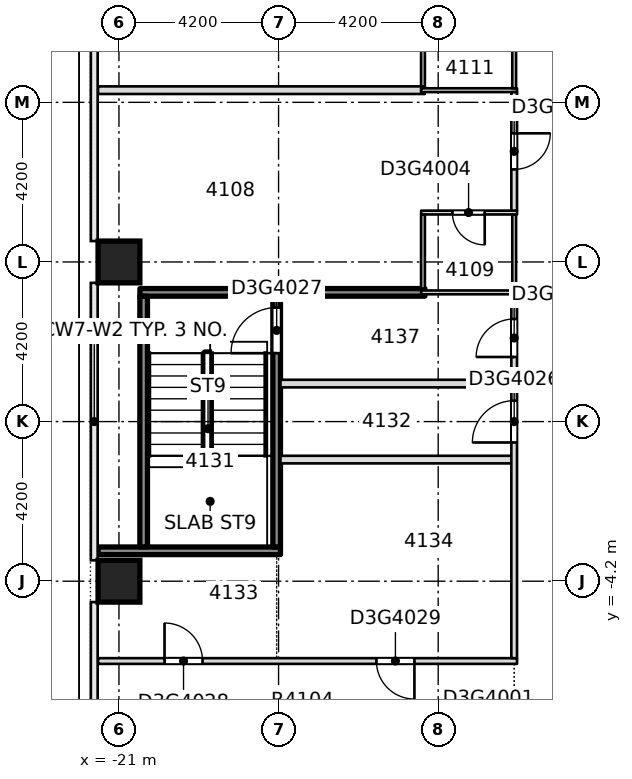
"""IFC4 building model, lengths in metres.
Left out: names, types, materials, properties, quantities, classifications, styles, units other than length and angle.
Written with IfcOpenShell. Run it as: python <this file> out.ifc"""

import sys

from ifc_helpers import new_model, si_unit, direction, frame, frame_2d, origin, origin_2d, place, context, subcontext, project, spatial, rectangle, extrude, element, fill, save


model = new_model("IFC4")
c1 = context("Model", 3, precision=1e-05, world=origin(), true_north=direction((0.0, 1.0)))
c2 = subcontext(c1, "Body", "Model", "MODEL_VIEW")
j1 = project(units=[si_unit("LENGTHUNIT", "METRE"), si_unit("PLANEANGLEUNIT", "RADIAN")], contexts=[c1])
p1 = place(None, origin())
s1 = spatial("IfcSite", under=j1, at=p1, CompositionType="ELEMENT")
p2 = place(p1, origin())
s2 = spatial("IfcBuilding", under=s1, at=p2, CompositionType="ELEMENT")
p3 = place(p2, frame((0.0, 0.0, 160.7)))
s3 = spatial("IfcBuildingStorey", under=s2, at=p3, CompositionType="ELEMENT", Elevation=160.7)
for number, where, z_axis, x_axis in (
    (1, (-21.0, -4.2, -0.4), (0.0, 0.0, 1.0), (1.0, 0.0, 0.0)),
    (2, (-21.0, 4.2, -0.4), (0.0, 0.0, 1.0), (1.0, 0.0, 0.0)),
):
    element("IfcColumn", number, at=place(p3, frame(where, z_axis=z_axis, x_axis=x_axis)), inside=s3, PredefinedType="COLUMN", context=c2, shape_type="SweptSolid", body=[
        extrude(rectangle(XDim=1.1, YDim=1.1, at=origin_2d()), origin(), (0.0, 0.0, 1.0), 3.45),
    ])
p4 = place(p3, frame((-21.55, -6.3, 0.0), z_axis=(0.0, 0.0, 1.0), x_axis=(1.0, 0.0, 0.0)))
e3 = element("IfcWall", 3, at=p4, inside=s3, PredefinedType="PARTITIONING", context=c2, shape_type="SweptSolid", body=[
    extrude(rectangle(XDim=11.025, YDim=0.15, at=frame_2d((5.513, 0.0))), origin(), (0.0, 0.0, 1.0), 3.05),
])
p5 = place(p4, frame((1.75, 0.0, 0.0)))
e4 = element("IfcOpeningElement", 4, at=p5, cuts=e3, PredefinedType="OPENING", context=c2, shape_type="SweptSolid", body=[
    extrude(rectangle(XDim=1.0, YDim=2.1, at=frame_2d((0.5, 1.05))), frame((0.0, 0.085, 0.0), z_axis=(0.0, -1.0, 0.0), x_axis=(1.0, 0.0, 0.0)), (0.0, 0.0, 1.0), 0.17),
])
p6 = place(p4, frame((7.325, 0.0, 0.0)))
e5 = element("IfcOpeningElement", 5, at=p6, cuts=e3, PredefinedType="OPENING", context=c2, shape_type="SweptSolid", body=[
    extrude(rectangle(XDim=1.0, YDim=2.1, at=frame_2d((0.5, 1.05))), frame((0.0, 0.085, 0.0), z_axis=(0.0, -1.0, 0.0), x_axis=(1.0, 0.0, 0.0)), (0.0, 0.0, 1.0), 0.17),
])
p7 = place(p3, frame((-21.55, -3.4, 0.0), z_axis=(0.0, 0.0, 1.0), x_axis=(1.0, 0.0, 0.0)))
e6 = element("IfcWall", 6, at=p7, inside=s3, PredefinedType="SOLIDWALL", context=c2, shape_type="SweptSolid", body=[
    extrude(rectangle(XDim=4.799, YDim=0.2, at=frame_2d((2.399, 0.0))), origin(), (0.0, 0.0, 1.0), 3.05),
])
for number, where, z_axis, x_axis in (
    (7, (-16.75, -1.0, 0.0), (0.0, 0.0, 1.0), (1.0, 0.0, 0.0)),
    (8, (-16.75, 1.0, 0.0), (0.0, 0.0, 1.0), (1.0, 0.0, 0.0)),
):
    element("IfcWall", number, at=place(p3, frame(where, z_axis=z_axis, x_axis=x_axis)), inside=s3, PredefinedType="PARTITIONING", context=c2, shape_type="SweptSolid", body=[
        extrude(rectangle(XDim=6.075, YDim=0.2, at=frame_2d((3.038, 0.0))), origin(), (0.0, 0.0, 1.0), 3.05),
    ])
p8 = place(p3, frame((-20.448, 3.4, 0.0), z_axis=(0.0, 0.0, 1.0), x_axis=(1.0, 0.0, 0.0)))
e9 = element("IfcWall", 9, at=p8, inside=s3, PredefinedType="SOLIDWALL", context=c2, shape_type="SweptSolid", body=[
    extrude(rectangle(XDim=7.498, YDim=0.2, at=frame_2d((3.749, 0.0))), origin(), (0.0, 0.0, 1.0), 3.05),
])
p9 = place(p3, frame((-13.05, 3.4, 0.0), z_axis=(0.0, 0.0, 1.0), x_axis=(1.0, 0.0, 0.0)))
e10 = element("IfcWall", 10, at=p9, inside=s3, PredefinedType="PARTITIONING", context=c2, shape_type="SweptSolid", body=[
    extrude(rectangle(XDim=2.525, YDim=0.1, at=frame_2d((1.263, 0.0))), origin(), (0.0, 0.0, 1.0), 3.05),
])
p10 = place(p3, frame((-13.048, 5.5, 0.0), z_axis=(0.0, 0.0, 1.0), x_axis=(1.0, 0.0, 0.0)))
e11 = element("IfcWall", 11, at=p10, inside=s3, PredefinedType="PARTITIONING", context=c2, shape_type="SweptSolid", body=[
    extrude(rectangle(XDim=2.523, YDim=0.1, at=frame_2d((1.262, 0.0))), origin(), (0.0, 0.0, 1.0), 3.05),
])
p11 = place(p10, frame((0.823, 0.0, 0.0)))
e12 = element("IfcOpeningElement", 12, at=p11, cuts=e11, PredefinedType="OPENING", context=c2, shape_type="SweptSolid", body=[
    extrude(rectangle(XDim=0.85, YDim=2.1, at=frame_2d((0.425, 1.05))), frame((0.0, 0.06, 0.0), z_axis=(0.0, -1.0, 0.0), x_axis=(1.0, 0.0, 0.0)), (0.0, 0.0, 1.0), 0.12),
])
p12 = place(p3, frame((-21.55, 8.72, 0.0), z_axis=(0.0, 0.0, 1.0), x_axis=(1.0, 0.0, 0.0)))
e13 = element("IfcWall", 13, at=p12, inside=s3, PredefinedType="PARTITIONING", context=c2, shape_type="SweptSolid", body=[
    extrude(rectangle(XDim=8.6, YDim=0.2, at=frame_2d((4.3, 0.0))), origin(), (0.0, 0.0, 1.0), 3.05),
])
p13 = place(p3, frame((-13.05, 8.72, 0.0), z_axis=(0.0, 0.0, 1.0), x_axis=(1.0, 0.0, 0.0)))
e14 = element("IfcWall", 14, at=p13, inside=s3, PredefinedType="PARTITIONING", context=c2, shape_type="SweptSolid", body=[
    extrude(rectangle(XDim=2.525, YDim=0.1, at=frame_2d((1.263, 0.0))), origin(), (0.0, 0.0, 1.0), 3.05),
])
p14 = place(p3, frame((-20.35, -3.298, 0.0), z_axis=(0.0, 0.0, 1.0), x_axis=(0.0, 1.0, 0.0)))
e15 = element("IfcWall", 15, at=p14, inside=s3, PredefinedType="SOLIDWALL", context=c2, shape_type="SweptSolid", body=[
    extrude(rectangle(XDim=6.596, YDim=0.2, at=frame_2d((3.298, 0.0))), origin(), (0.0, 0.0, 1.0), 3.05),
])
p15 = place(p3, frame((-16.85, -3.3, 0.0), z_axis=(0.0, 0.0, 1.0), x_axis=(0.0, 1.0, 0.0)))
e16 = element("IfcWall", 16, at=p15, inside=s3, PredefinedType="SOLIDWALL", context=c2, shape_type="SweptSolid", body=[
    extrude(rectangle(XDim=6.6, YDim=0.2, at=frame_2d((3.3, 0.0))), origin(), (0.0, 0.0, 1.0), 3.05),
])
p16 = place(p15, frame((5.1, 0.0, 0.0)))
e17 = element("IfcOpeningElement", 17, at=p16, cuts=e16, PredefinedType="OPENING", context=c2, shape_type="SweptSolid", body=[
    extrude(rectangle(XDim=1.2, YDim=2.1, at=frame_2d((0.6, 1.05))), frame((0.0, 0.11, 0.0), z_axis=(0.0, -1.0, 0.0), x_axis=(1.0, 0.0, 0.0)), (0.0, 0.0, 1.0), 0.22),
])
p17 = place(p3, frame((-13.0, 3.5, 0.0), z_axis=(0.0, 0.0, 1.0), x_axis=(0.0, 1.0, 0.0)))
e18 = element("IfcWall", 18, at=p17, inside=s3, PredefinedType="PARTITIONING", context=c2, shape_type="SweptSolid", body=[
    extrude(rectangle(XDim=1.948, YDim=0.1, at=frame_2d((0.974, 0.0))), origin(), (0.0, 0.0, 1.0), 3.05),
])
p18 = place(p3, frame((-13.0, 8.82, 0.0), z_axis=(0.0, 0.0, 1.0), x_axis=(0.0, 1.0, 0.0)))
e19 = element("IfcWall", 19, at=p18, inside=s3, PredefinedType="PARTITIONING", context=c2, shape_type="SweptSolid", body=[
    extrude(rectangle(XDim=1.95, YDim=0.1, at=frame_2d((0.975, 0.0))), origin(), (0.0, 0.0, 1.0), 3.05),
])
p19 = place(p3, frame((-10.6, -6.225, 0.0), z_axis=(0.0, 0.0, 1.0), x_axis=(0.0, 1.0, 0.0)))
e20 = element("IfcWall", 20, at=p19, inside=s3, PredefinedType="PARTITIONING", context=c2, shape_type="SweptSolid", body=[
    extrude(rectangle(XDim=9.575, YDim=0.15, at=frame_2d((4.788, 0.0))), origin(), (0.0, 0.0, 1.0), 3.05),
])
p20 = place(p19, frame((5.675, 0.0, 0.0)))
e21 = element("IfcOpeningElement", 21, at=p20, cuts=e20, PredefinedType="OPENING", context=c2, shape_type="SweptSolid", body=[
    extrude(rectangle(XDim=1.1, YDim=2.1, at=frame_2d((0.55, 1.05))), frame((0.0, 0.085, 0.0), z_axis=(0.0, -1.0, 0.0), x_axis=(1.0, 0.0, 0.0)), (0.0, 0.0, 1.0), 0.17),
])
p21 = place(p19, frame((7.925, 0.0, 0.0)))
e22 = element("IfcOpeningElement", 22, at=p21, cuts=e20, PredefinedType="OPENING", context=c2, shape_type="SweptSolid", body=[
    extrude(rectangle(XDim=1.0, YDim=2.1, at=frame_2d((0.5, 1.05))), frame((0.0, 0.085, 0.0), z_axis=(0.0, -1.0, 0.0), x_axis=(1.0, 0.0, 0.0)), (0.0, 0.0, 1.0), 0.17),
])
p22 = place(p3, frame((-10.6, 3.45, 0.0), z_axis=(0.0, 0.0, 1.0), x_axis=(0.0, 1.0, 0.0)))
e23 = element("IfcWall", 23, at=p22, inside=s3, PredefinedType="PARTITIONING", context=c2, shape_type="SweptSolid", body=[
    extrude(rectangle(XDim=2.0, YDim=0.1, at=frame_2d((1.0, 0.0))), origin(), (0.0, 0.0, 1.0), 3.05),
])
p23 = place(p3, frame((-10.6, 5.55, 0.0), z_axis=(0.0, 0.0, 1.0), x_axis=(0.0, 1.0, 0.0)))
e24 = element("IfcWall", 24, at=p23, inside=s3, PredefinedType="PARTITIONING", context=c2, shape_type="SweptSolid", body=[
    extrude(rectangle(XDim=3.12, YDim=0.15, at=frame_2d((1.56, 0.0))), origin(), (0.0, 0.0, 1.0), 3.05),
])
p24 = place(p23, frame((1.085, 0.0, 0.0)))
e25 = element("IfcOpeningElement", 25, at=p24, cuts=e24, PredefinedType="OPENING", context=c2, shape_type="SweptSolid", body=[
    extrude(rectangle(XDim=0.95, YDim=2.1, at=frame_2d((0.475, 1.05))), frame((0.0, 0.085, 0.0), z_axis=(0.0, -1.0, 0.0), x_axis=(1.0, 0.0, 0.0)), (0.0, 0.0, 1.0), 0.17),
])
p25 = place(p3, frame((-10.6, 8.77, 0.0), z_axis=(0.0, 0.0, 1.0), x_axis=(0.0, 1.0, 0.0)))
e26 = element("IfcWall", 26, at=p25, inside=s3, PredefinedType="PARTITIONING", context=c2, shape_type="SweptSolid", body=[
    extrude(rectangle(XDim=2.0, YDim=0.1, at=frame_2d((1.0, 0.0))), origin(), (0.0, 0.0, 1.0), 3.05),
])
p26 = place(p24, origin())
e27 = element("IfcDoor", 27, at=p26, inside=s3, OperationType="SINGLE_SWING_LEFT", PredefinedType="DOOR", context=c2, shape_type="SweptSolid", body=[
    extrude(rectangle(XDim=0.95, YDim=2.1, at=frame_2d((0.475, 1.05))), frame((0.0, 0.025, 0.0), z_axis=(0.0, -1.0, 0.0), x_axis=(1.0, 0.0, 0.0)), (0.0, 0.0, 1.0), 0.05),
])
fill(e25, e27)
p27 = place(p11, origin())
e28 = element("IfcDoor", 28, at=p27, inside=s3, OperationType="SINGLE_SWING_RIGHT", PredefinedType="DOOR", context=c2, shape_type="SweptSolid", body=[
    extrude(rectangle(XDim=0.85, YDim=2.1, at=frame_2d((0.425, 1.05))), frame((0.0, 0.025, 0.0), z_axis=(0.0, -1.0, 0.0), x_axis=(1.0, 0.0, 0.0)), (0.0, 0.0, 1.0), 0.05),
])
fill(e12, e28)
p28 = place(p20, origin())
e29 = element("IfcDoor", 29, at=p28, inside=s3, OperationType="SINGLE_SWING_RIGHT", PredefinedType="DOOR", context=c2, shape_type="SweptSolid", body=[
    extrude(rectangle(XDim=1.1, YDim=2.1, at=frame_2d((0.55, 1.05))), frame((0.0, 0.025, 0.0), z_axis=(0.0, -1.0, 0.0), x_axis=(1.0, 0.0, 0.0)), (0.0, 0.0, 1.0), 0.05),
])
fill(e21, e29)
p29 = place(p16, origin())
e30 = element("IfcDoor", 30, at=p29, inside=s3, OperationType="SINGLE_SWING_RIGHT", PredefinedType="DOOR", context=c2, shape_type="SweptSolid", body=[
    extrude(rectangle(XDim=1.2, YDim=2.1, at=frame_2d((0.6, 1.05))), frame((0.0, 0.025, 0.0), z_axis=(0.0, -1.0, 0.0), x_axis=(1.0, 0.0, 0.0)), (0.0, 0.0, 1.0), 0.05),
])
fill(e17, e30)
p30 = place(p5, origin())
e31 = element("IfcDoor", 31, at=p30, inside=s3, OperationType="SINGLE_SWING_RIGHT", PredefinedType="DOOR", context=c2, shape_type="SweptSolid", body=[
    extrude(rectangle(XDim=1.0, YDim=2.1, at=frame_2d((0.5, 1.05))), frame((0.0, 0.025, 0.0), z_axis=(0.0, -1.0, 0.0), x_axis=(1.0, 0.0, 0.0)), (0.0, 0.0, 1.0), 0.05),
])
fill(e4, e31)
p31 = place(p6, origin())
e32 = element("IfcDoor", 32, at=p31, inside=s3, OperationType="SINGLE_SWING_LEFT", PredefinedType="DOOR", context=c2, shape_type="SweptSolid", body=[
    extrude(rectangle(XDim=1.0, YDim=2.1, at=frame_2d((0.5, 1.05))), frame((0.0, 0.025, 0.0), z_axis=(0.0, -1.0, 0.0), x_axis=(1.0, 0.0, 0.0)), (0.0, 0.0, 1.0), 0.05),
])
fill(e5, e32)
p32 = place(p21, origin())
e33 = element("IfcDoor", 33, at=p32, inside=s3, OperationType="SINGLE_SWING_LEFT", PredefinedType="DOOR", context=c2, shape_type="SweptSolid", body=[
    extrude(rectangle(XDim=1.0, YDim=2.1, at=frame_2d((0.5, 1.05))), frame((0.0, 0.025, 0.0), z_axis=(0.0, -1.0, 0.0), x_axis=(1.0, 0.0, 0.0)), (0.0, 0.0, 1.0), 0.05),
])
fill(e22, e33)
save(model, sys.argv[1])
